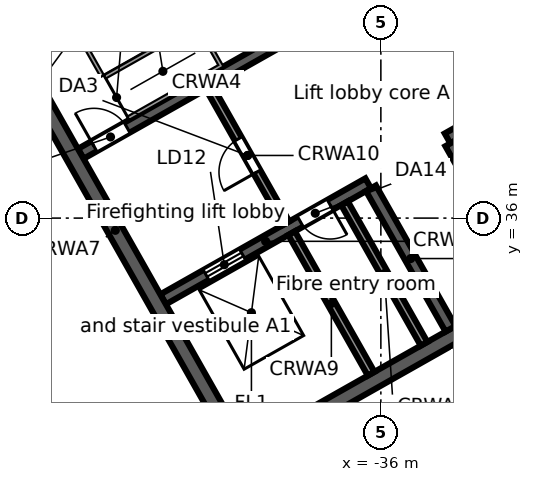
"""IFC4 building model, lengths in metres.
Left out: names, types, materials, properties, quantities, classifications, styles, units other than length and angle.
Written with IfcOpenShell. Run it as: python <this file> out.ifc"""

import sys

from ifc_helpers import new_model, si_unit, direction, frame, frame_2d, origin, place, context, subcontext, project, spatial, rectangle, extrude, element, fill, save


model = new_model("IFC4")
c1 = context("Model", 3, precision=1e-05, world=origin(), true_north=direction((0.0, 1.0)))
c2 = subcontext(c1, "Body", "Model", "MODEL_VIEW")
j1 = project(units=[si_unit("LENGTHUNIT", "METRE"), si_unit("PLANEANGLEUNIT", "RADIAN")], contexts=[c1])
p1 = place(None, origin())
s1 = spatial("IfcSite", under=j1, at=p1, CompositionType="ELEMENT")
p2 = place(p1, origin())
s2 = spatial("IfcBuilding", under=s1, at=p2, CompositionType="ELEMENT")
p3 = place(p2, frame((0.0, 0.0, 308.3)))
s3 = spatial("IfcBuildingStorey", under=s2, at=p3, CompositionType="ELEMENT", Elevation=308.3)
p4 = place(p3, frame((-58.732, 38.771, 0.0), z_axis=(0.0, 0.0, 1.0), x_axis=(0.870355615581, 0.492423702137, 0.0)))
e1 = element("IfcWall", 1, at=p4, inside=s3, PredefinedType="STANDARD", context=c2, shape_type="SweptSolid", body=[
    extrude(rectangle(XDim=64.052, YDim=0.25, at=frame_2d((32.026, 0.0))), origin(), (0.0, 0.0, 1.0), 3.45),
])
p5 = place(p4, frame((61.259, 0.0, 0.8)))
e2 = element("IfcOpeningElement", 2, at=p5, cuts=e1, PredefinedType="OPENING", context=c2, shape_type="SweptSolid", body=[
    extrude(rectangle(XDim=2.4, YDim=2.2, at=frame_2d((1.2, 1.1))), frame((0.0, 0.135, 0.0), z_axis=(0.0, -1.0, 0.0), x_axis=(1.0, 0.0, 0.0)), (0.0, 0.0, 1.0), 0.27),
])
p6 = place(p4, frame((58.216, 0.0, 0.8)))
e3 = element("IfcOpeningElement", 3, at=p6, cuts=e1, PredefinedType="OPENING", context=c2, shape_type="SweptSolid", body=[
    extrude(rectangle(XDim=2.4, YDim=2.2, at=frame_2d((1.2, 1.1))), frame((0.0, 0.135, 0.0), z_axis=(0.0, -1.0, 0.0), x_axis=(1.0, 0.0, 0.0)), (0.0, 0.0, 1.0), 0.27),
])
p7 = place(p4, frame((55.173, 0.0, 0.8)))
e4 = element("IfcOpeningElement", 4, at=p7, cuts=e1, PredefinedType="OPENING", context=c2, shape_type="SweptSolid", body=[
    extrude(rectangle(XDim=2.4, YDim=2.2, at=frame_2d((1.2, 1.1))), frame((0.0, 0.135, 0.0), z_axis=(0.0, -1.0, 0.0), x_axis=(1.0, 0.0, 0.0)), (0.0, 0.0, 1.0), 0.27),
])
p8 = place(p4, frame((52.129, 0.0, 0.8)))
e5 = element("IfcOpeningElement", 5, at=p8, cuts=e1, PredefinedType="OPENING", context=c2, shape_type="SweptSolid", body=[
    extrude(rectangle(XDim=2.4, YDim=2.2, at=frame_2d((1.2, 1.1))), frame((0.0, 0.135, 0.0), z_axis=(0.0, -1.0, 0.0), x_axis=(1.0, 0.0, 0.0)), (0.0, 0.0, 1.0), 0.27),
])
p9 = place(p4, frame((49.086, 0.0, 0.8)))
e6 = element("IfcOpeningElement", 6, at=p9, cuts=e1, PredefinedType="OPENING", context=c2, shape_type="SweptSolid", body=[
    extrude(rectangle(XDim=2.4, YDim=2.2, at=frame_2d((1.2, 1.1))), frame((0.0, 0.135, 0.0), z_axis=(0.0, -1.0, 0.0), x_axis=(1.0, 0.0, 0.0)), (0.0, 0.0, 1.0), 0.27),
])
p10 = place(p4, frame((46.043, 0.0, 0.8)))
e7 = element("IfcOpeningElement", 7, at=p10, cuts=e1, PredefinedType="OPENING", context=c2, shape_type="SweptSolid", body=[
    extrude(rectangle(XDim=2.4, YDim=2.2, at=frame_2d((1.2, 1.1))), frame((0.0, 0.135, 0.0), z_axis=(0.0, -1.0, 0.0), x_axis=(1.0, 0.0, 0.0)), (0.0, 0.0, 1.0), 0.27),
])
p11 = place(p4, frame((43.0, 0.0, 0.8)))
e8 = element("IfcOpeningElement", 8, at=p11, cuts=e1, PredefinedType="OPENING", context=c2, shape_type="SweptSolid", body=[
    extrude(rectangle(XDim=2.4, YDim=2.2, at=frame_2d((1.2, 1.1))), frame((0.0, 0.135, 0.0), z_axis=(0.0, -1.0, 0.0), x_axis=(1.0, 0.0, 0.0)), (0.0, 0.0, 1.0), 0.27),
])
p12 = place(p4, frame((39.956, 0.0, 0.8)))
e9 = element("IfcOpeningElement", 9, at=p12, cuts=e1, PredefinedType="OPENING", context=c2, shape_type="SweptSolid", body=[
    extrude(rectangle(XDim=2.4, YDim=2.2, at=frame_2d((1.2, 1.1))), frame((0.0, 0.135, 0.0), z_axis=(0.0, -1.0, 0.0), x_axis=(1.0, 0.0, 0.0)), (0.0, 0.0, 1.0), 0.27),
])
p13 = place(p4, frame((36.913, 0.0, 0.8)))
e10 = element("IfcOpeningElement", 10, at=p13, cuts=e1, PredefinedType="OPENING", context=c2, shape_type="SweptSolid", body=[
    extrude(rectangle(XDim=2.4, YDim=2.2, at=frame_2d((1.2, 1.1))), frame((0.0, 0.135, 0.0), z_axis=(0.0, -1.0, 0.0), x_axis=(1.0, 0.0, 0.0)), (0.0, 0.0, 1.0), 0.27),
])
p14 = place(p4, frame((33.87, 0.0, 0.8)))
e11 = element("IfcOpeningElement", 11, at=p14, cuts=e1, PredefinedType="OPENING", context=c2, shape_type="SweptSolid", body=[
    extrude(rectangle(XDim=2.4, YDim=2.2, at=frame_2d((1.2, 1.1))), frame((0.0, 0.135, 0.0), z_axis=(0.0, -1.0, 0.0), x_axis=(1.0, 0.0, 0.0)), (0.0, 0.0, 1.0), 0.27),
])
p15 = place(p4, frame((30.826, 0.0, 0.8)))
e12 = element("IfcOpeningElement", 12, at=p15, cuts=e1, PredefinedType="OPENING", context=c2, shape_type="SweptSolid", body=[
    extrude(rectangle(XDim=2.4, YDim=2.2, at=frame_2d((1.2, 1.1))), frame((0.0, 0.135, 0.0), z_axis=(0.0, -1.0, 0.0), x_axis=(1.0, 0.0, 0.0)), (0.0, 0.0, 1.0), 0.27),
])
p16 = place(p4, frame((27.783, 0.0, 0.8)))
e13 = element("IfcOpeningElement", 13, at=p16, cuts=e1, PredefinedType="OPENING", context=c2, shape_type="SweptSolid", body=[
    extrude(rectangle(XDim=2.4, YDim=2.2, at=frame_2d((1.2, 1.1))), frame((0.0, 0.135, 0.0), z_axis=(0.0, -1.0, 0.0), x_axis=(1.0, 0.0, 0.0)), (0.0, 0.0, 1.0), 0.27),
])
p17 = place(p4, frame((24.74, 0.0, 0.8)))
e14 = element("IfcOpeningElement", 14, at=p17, cuts=e1, PredefinedType="OPENING", context=c2, shape_type="SweptSolid", body=[
    extrude(rectangle(XDim=2.4, YDim=2.2, at=frame_2d((1.2, 1.1))), frame((0.0, 0.135, 0.0), z_axis=(0.0, -1.0, 0.0), x_axis=(1.0, 0.0, 0.0)), (0.0, 0.0, 1.0), 0.27),
])
p18 = place(p4, frame((21.696, 0.0, 0.8)))
e15 = element("IfcOpeningElement", 15, at=p18, cuts=e1, PredefinedType="OPENING", context=c2, shape_type="SweptSolid", body=[
    extrude(rectangle(XDim=2.4, YDim=2.2, at=frame_2d((1.2, 1.1))), frame((0.0, 0.135, 0.0), z_axis=(0.0, -1.0, 0.0), x_axis=(1.0, 0.0, 0.0)), (0.0, 0.0, 1.0), 0.27),
])
p19 = place(p4, frame((18.653, 0.0, 0.8)))
e16 = element("IfcOpeningElement", 16, at=p19, cuts=e1, PredefinedType="OPENING", context=c2, shape_type="SweptSolid", body=[
    extrude(rectangle(XDim=2.4, YDim=2.2, at=frame_2d((1.2, 1.1))), frame((0.0, 0.135, 0.0), z_axis=(0.0, -1.0, 0.0), x_axis=(1.0, 0.0, 0.0)), (0.0, 0.0, 1.0), 0.27),
])
p20 = place(p4, frame((15.61, 0.0, 0.8)))
e17 = element("IfcOpeningElement", 17, at=p20, cuts=e1, PredefinedType="OPENING", context=c2, shape_type="SweptSolid", body=[
    extrude(rectangle(XDim=2.4, YDim=2.2, at=frame_2d((1.2, 1.1))), frame((0.0, 0.135, 0.0), z_axis=(0.0, -1.0, 0.0), x_axis=(1.0, 0.0, 0.0)), (0.0, 0.0, 1.0), 0.27),
])
p21 = place(p4, frame((12.567, 0.0, 0.8)))
e18 = element("IfcOpeningElement", 18, at=p21, cuts=e1, PredefinedType="OPENING", context=c2, shape_type="SweptSolid", body=[
    extrude(rectangle(XDim=2.4, YDim=2.2, at=frame_2d((1.2, 1.1))), frame((0.0, 0.135, 0.0), z_axis=(0.0, -1.0, 0.0), x_axis=(1.0, 0.0, 0.0)), (0.0, 0.0, 1.0), 0.27),
])
p22 = place(p4, frame((9.523, 0.0, 0.8)))
e19 = element("IfcOpeningElement", 19, at=p22, cuts=e1, PredefinedType="OPENING", context=c2, shape_type="SweptSolid", body=[
    extrude(rectangle(XDim=2.4, YDim=2.2, at=frame_2d((1.2, 1.1))), frame((0.0, 0.135, 0.0), z_axis=(0.0, -1.0, 0.0), x_axis=(1.0, 0.0, 0.0)), (0.0, 0.0, 1.0), 0.27),
])
p23 = place(p4, frame((6.48, 0.0, 0.8)))
e20 = element("IfcOpeningElement", 20, at=p23, cuts=e1, PredefinedType="OPENING", context=c2, shape_type="SweptSolid", body=[
    extrude(rectangle(XDim=2.4, YDim=2.2, at=frame_2d((1.2, 1.1))), frame((0.0, 0.135, 0.0), z_axis=(0.0, -1.0, 0.0), x_axis=(1.0, 0.0, 0.0)), (0.0, 0.0, 1.0), 0.27),
])
p24 = place(p4, frame((3.437, 0.0, 0.8)))
e21 = element("IfcOpeningElement", 21, at=p24, cuts=e1, PredefinedType="OPENING", context=c2, shape_type="SweptSolid", body=[
    extrude(rectangle(XDim=2.4, YDim=2.2, at=frame_2d((1.2, 1.1))), frame((0.0, 0.135, 0.0), z_axis=(0.0, -1.0, 0.0), x_axis=(1.0, 0.0, 0.0)), (0.0, 0.0, 1.0), 0.27),
])
p25 = place(p4, frame((0.393, 0.0, 0.8)))
e22 = element("IfcOpeningElement", 22, at=p25, cuts=e1, PredefinedType="OPENING", context=c2, shape_type="SweptSolid", body=[
    extrude(rectangle(XDim=2.4, YDim=2.2, at=frame_2d((1.2, 1.1))), frame((0.0, 0.135, 0.0), z_axis=(0.0, -1.0, 0.0), x_axis=(1.0, 0.0, 0.0)), (0.0, 0.0, 1.0), 0.27),
])
p26 = place(p3, frame((-44.115, 26.507, 0.0), z_axis=(0.0, 0.0, 1.0), x_axis=(-0.857166583633, 0.515039268311, 0.0)))
e23 = element("IfcWall", 23, at=p26, inside=s3, PredefinedType="STANDARD", context=c2, shape_type="SweptSolid", body=[
    extrude(rectangle(XDim=17.106, YDim=0.25, at=frame_2d((8.553, 0.0))), origin(), (0.0, 0.0, 1.0), 3.45),
])
p27 = place(p26, frame((14.417, 0.0, 0.8)))
e24 = element("IfcOpeningElement", 24, at=p27, cuts=e23, PredefinedType="OPENING", context=c2, shape_type="SweptSolid", body=[
    extrude(rectangle(XDim=2.4, YDim=2.2, at=frame_2d((1.2, 1.1))), frame((0.0, 0.135, 0.0), z_axis=(0.0, -1.0, 0.0), x_axis=(1.0, 0.0, 0.0)), (0.0, 0.0, 1.0), 0.27),
])
p28 = place(p26, frame((11.584, 0.0, 0.8)))
e25 = element("IfcOpeningElement", 25, at=p28, cuts=e23, PredefinedType="OPENING", context=c2, shape_type="SweptSolid", body=[
    extrude(rectangle(XDim=2.4, YDim=2.2, at=frame_2d((1.2, 1.1))), frame((0.0, 0.135, 0.0), z_axis=(0.0, -1.0, 0.0), x_axis=(1.0, 0.0, 0.0)), (0.0, 0.0, 1.0), 0.27),
])
p29 = place(p26, frame((8.75, 0.0, 0.8)))
e26 = element("IfcOpeningElement", 26, at=p29, cuts=e23, PredefinedType="OPENING", context=c2, shape_type="SweptSolid", body=[
    extrude(rectangle(XDim=2.4, YDim=2.2, at=frame_2d((1.2, 1.1))), frame((0.0, 0.135, 0.0), z_axis=(0.0, -1.0, 0.0), x_axis=(1.0, 0.0, 0.0)), (0.0, 0.0, 1.0), 0.27),
])
p30 = place(p26, frame((5.917, 0.0, 0.8)))
e27 = element("IfcOpeningElement", 27, at=p30, cuts=e23, PredefinedType="OPENING", context=c2, shape_type="SweptSolid", body=[
    extrude(rectangle(XDim=2.4, YDim=2.2, at=frame_2d((1.2, 1.1))), frame((0.0, 0.135, 0.0), z_axis=(0.0, -1.0, 0.0), x_axis=(1.0, 0.0, 0.0)), (0.0, 0.0, 1.0), 0.27),
])
p31 = place(p26, frame((3.084, 0.0, 0.8)))
e28 = element("IfcOpeningElement", 28, at=p31, cuts=e23, PredefinedType="OPENING", context=c2, shape_type="SweptSolid", body=[
    extrude(rectangle(XDim=2.4, YDim=2.2, at=frame_2d((1.2, 1.1))), frame((0.0, 0.135, 0.0), z_axis=(0.0, -1.0, 0.0), x_axis=(1.0, 0.0, 0.0)), (0.0, 0.0, 1.0), 0.27),
])
p32 = place(p26, frame((0.25, 0.0, 0.8)))
e29 = element("IfcOpeningElement", 29, at=p32, cuts=e23, PredefinedType="OPENING", context=c2, shape_type="SweptSolid", body=[
    extrude(rectangle(XDim=2.4, YDim=2.2, at=frame_2d((1.2, 1.1))), frame((0.0, 0.135, 0.0), z_axis=(0.0, -1.0, 0.0), x_axis=(1.0, 0.0, 0.0)), (0.0, 0.0, 1.0), 0.27),
])
p33 = place(p3, frame((-3.017, 46.293, 0.0), z_axis=(0.0, 0.0, 1.0), x_axis=(-0.870355474887, -0.492423950812, 0.0)))
e30 = element("IfcWall", 30, at=p33, inside=s3, PredefinedType="STANDARD", context=c2, shape_type="SweptSolid", body=[
    extrude(rectangle(XDim=40.34, YDim=0.25, at=frame_2d((20.17, 0.0))), origin(), (0.0, 0.0, 1.0), 3.45),
])
p34 = place(p33, frame((37.428, 0.0, 0.8)))
e31 = element("IfcOpeningElement", 31, at=p34, cuts=e30, PredefinedType="OPENING", context=c2, shape_type="SweptSolid", body=[
    extrude(rectangle(XDim=2.4, YDim=2.2, at=frame_2d((1.2, 1.1))), frame((0.0, 0.135, 0.0), z_axis=(0.0, -1.0, 0.0), x_axis=(1.0, 0.0, 0.0)), (0.0, 0.0, 1.0), 0.27),
])
p35 = place(p33, frame((34.372, 0.0, 0.0)))
e32 = element("IfcOpeningElement", 32, at=p35, cuts=e30, PredefinedType="OPENING", context=c2, shape_type="SweptSolid", body=[
    extrude(rectangle(XDim=1.8, YDim=2.4, at=frame_2d((0.9, 1.2))), frame((0.0, 0.135, 0.0), z_axis=(0.0, -1.0, 0.0), x_axis=(1.0, 0.0, 0.0)), (0.0, 0.0, 1.0), 0.27),
])
p36 = place(p33, frame((30.716, 0.0, 0.8)))
e33 = element("IfcOpeningElement", 33, at=p36, cuts=e30, PredefinedType="OPENING", context=c2, shape_type="SweptSolid", body=[
    extrude(rectangle(XDim=2.4, YDim=2.2, at=frame_2d((1.2, 1.1))), frame((0.0, 0.135, 0.0), z_axis=(0.0, -1.0, 0.0), x_axis=(1.0, 0.0, 0.0)), (0.0, 0.0, 1.0), 0.27),
])
p37 = place(p33, frame((27.36, 0.0, 0.8)))
e34 = element("IfcOpeningElement", 34, at=p37, cuts=e30, PredefinedType="OPENING", context=c2, shape_type="SweptSolid", body=[
    extrude(rectangle(XDim=2.4, YDim=2.2, at=frame_2d((1.2, 1.1))), frame((0.0, 0.135, 0.0), z_axis=(0.0, -1.0, 0.0), x_axis=(1.0, 0.0, 0.0)), (0.0, 0.0, 1.0), 0.27),
])
p38 = place(p33, frame((24.304, 0.0, 0.0)))
e35 = element("IfcOpeningElement", 35, at=p38, cuts=e30, PredefinedType="OPENING", context=c2, shape_type="SweptSolid", body=[
    extrude(rectangle(XDim=1.8, YDim=2.4, at=frame_2d((0.9, 1.2))), frame((0.0, 0.135, 0.0), z_axis=(0.0, -1.0, 0.0), x_axis=(1.0, 0.0, 0.0)), (0.0, 0.0, 1.0), 0.27),
])
p39 = place(p33, frame((20.648, 0.0, 0.8)))
e36 = element("IfcOpeningElement", 36, at=p39, cuts=e30, PredefinedType="OPENING", context=c2, shape_type="SweptSolid", body=[
    extrude(rectangle(XDim=2.4, YDim=2.2, at=frame_2d((1.2, 1.1))), frame((0.0, 0.135, 0.0), z_axis=(0.0, -1.0, 0.0), x_axis=(1.0, 0.0, 0.0)), (0.0, 0.0, 1.0), 0.27),
])
p40 = place(p33, frame((17.292, 0.0, 0.8)))
e37 = element("IfcOpeningElement", 37, at=p40, cuts=e30, PredefinedType="OPENING", context=c2, shape_type="SweptSolid", body=[
    extrude(rectangle(XDim=2.4, YDim=2.2, at=frame_2d((1.2, 1.1))), frame((0.0, 0.135, 0.0), z_axis=(0.0, -1.0, 0.0), x_axis=(1.0, 0.0, 0.0)), (0.0, 0.0, 1.0), 0.27),
])
p41 = place(p33, frame((14.236, 0.0, 0.0)))
e38 = element("IfcOpeningElement", 38, at=p41, cuts=e30, PredefinedType="OPENING", context=c2, shape_type="SweptSolid", body=[
    extrude(rectangle(XDim=1.8, YDim=2.4, at=frame_2d((0.9, 1.2))), frame((0.0, 0.135, 0.0), z_axis=(0.0, -1.0, 0.0), x_axis=(1.0, 0.0, 0.0)), (0.0, 0.0, 1.0), 0.27),
])
p42 = place(p33, frame((10.58, 0.0, 0.8)))
e39 = element("IfcOpeningElement", 39, at=p42, cuts=e30, PredefinedType="OPENING", context=c2, shape_type="SweptSolid", body=[
    extrude(rectangle(XDim=2.4, YDim=2.2, at=frame_2d((1.2, 1.1))), frame((0.0, 0.135, 0.0), z_axis=(0.0, -1.0, 0.0), x_axis=(1.0, 0.0, 0.0)), (0.0, 0.0, 1.0), 0.27),
])
p43 = place(p33, frame((7.224, 0.0, 0.8)))
e40 = element("IfcOpeningElement", 40, at=p43, cuts=e30, PredefinedType="OPENING", context=c2, shape_type="SweptSolid", body=[
    extrude(rectangle(XDim=2.4, YDim=2.2, at=frame_2d((1.2, 1.1))), frame((0.0, 0.135, 0.0), z_axis=(0.0, -1.0, 0.0), x_axis=(1.0, 0.0, 0.0)), (0.0, 0.0, 1.0), 0.27),
])
p44 = place(p33, frame((4.168, 0.0, 0.0)))
e41 = element("IfcOpeningElement", 41, at=p44, cuts=e30, PredefinedType="OPENING", context=c2, shape_type="SweptSolid", body=[
    extrude(rectangle(XDim=1.8, YDim=2.4, at=frame_2d((0.9, 1.2))), frame((0.0, 0.135, 0.0), z_axis=(0.0, -1.0, 0.0), x_axis=(1.0, 0.0, 0.0)), (0.0, 0.0, 1.0), 0.27),
])
p45 = place(p33, frame((0.512, 0.0, 0.8)))
e42 = element("IfcOpeningElement", 42, at=p45, cuts=e30, PredefinedType="OPENING", context=c2, shape_type="SweptSolid", body=[
    extrude(rectangle(XDim=2.4, YDim=2.2, at=frame_2d((1.2, 1.1))), frame((0.0, 0.135, 0.0), z_axis=(0.0, -1.0, 0.0), x_axis=(1.0, 0.0, 0.0)), (0.0, 0.0, 1.0), 0.27),
])
p46 = place(p3, frame((-39.813, 29.662, 0.0), z_axis=(0.0, 0.0, 1.0), x_axis=(0.870350116061, 0.492433422375, 0.0)))
e43 = element("IfcWall", 43, at=p46, inside=s3, PredefinedType="SOLIDWALL", context=c2, shape_type="SweptSolid", body=[
    extrude(rectangle(XDim=17.0, YDim=0.4, at=frame_2d((8.5, 0.0))), origin(), (0.0, 0.0, 1.0), 3.45),
])
p47 = place(p46, frame((7.2, 0.0, 0.0)))
e44 = element("IfcOpeningElement", 44, at=p47, cuts=e43, PredefinedType="OPENING", context=c2, shape_type="SweptSolid", body=[
    extrude(rectangle(XDim=1.2, YDim=2.1, at=frame_2d((0.6, 1.05))), frame((0.0, 0.21, 0.0), z_axis=(0.0, -1.0, 0.0), x_axis=(1.0, 0.0, 0.0)), (0.0, 0.0, 1.0), 0.42),
])
p48 = place(p3, frame((-41.73, 33.863, 0.0), z_axis=(0.0, 0.0, 1.0), x_axis=(0.870350800578, 0.492432212525, 0.0)))
e45 = element("IfcWall", 45, at=p48, inside=s3, PredefinedType="SOLIDWALL", context=c2, shape_type="SweptSolid", body=[
    extrude(rectangle(XDim=6.2, YDim=0.3, at=frame_2d((3.1, 0.0))), origin(), (0.0, 0.0, 1.0), 3.45),
])
p49 = place(p48, frame((1.3, 0.0, 0.0)))
e46 = element("IfcOpeningElement", 46, at=p49, cuts=e45, PredefinedType="OPENING", context=c2, shape_type="SweptSolid", body=[
    extrude(rectangle(XDim=1.1, YDim=2.1, at=frame_2d((0.55, 1.05))), frame((0.0, 0.16, 0.0), z_axis=(0.0, -1.0, 0.0), x_axis=(1.0, 0.0, 0.0)), (0.0, 0.0, 1.0), 0.32),
])
p50 = place(p48, frame((4.15, 0.0, 0.0)))
e47 = element("IfcOpeningElement", 47, at=p50, cuts=e45, PredefinedType="OPENING", context=c2, shape_type="SweptSolid", body=[
    extrude(rectangle(XDim=0.9, YDim=2.1, at=frame_2d((0.45, 1.05))), frame((0.0, 0.16, 0.0), z_axis=(0.0, -1.0, 0.0), x_axis=(1.0, 0.0, 0.0)), (0.0, 0.0, 1.0), 0.32),
])
p51 = place(p3, frame((-34.245, 38.097, 0.0), z_axis=(0.0, 0.0, 1.0), x_axis=(0.870356351998, 0.492422400523, 0.0)))
e48 = element("IfcWall", 48, at=p51, inside=s3, PredefinedType="SOLIDWALL", context=c2, shape_type="SweptSolid", body=[
    extrude(rectangle(XDim=7.6, YDim=0.3, at=frame_2d((3.8, 0.0))), origin(), (0.0, 0.0, 1.0), 3.45),
])
p52 = place(p51, frame((6.2, 0.0, 0.0)))
e49 = element("IfcOpeningElement", 49, at=p52, cuts=e48, PredefinedType="OPENING", context=c2, shape_type="SweptSolid", body=[
    extrude(rectangle(XDim=1.0, YDim=2.1, at=frame_2d((0.5, 1.05))), frame((0.0, 0.16, 0.0), z_axis=(0.0, -1.0, 0.0), x_axis=(1.0, 0.0, 0.0)), (0.0, 0.0, 1.0), 0.32),
])
p53 = place(p3, frame((-43.897, 37.692, 0.0), z_axis=(0.0, 0.0, 1.0), x_axis=(0.870356351998, 0.492422400523, 0.0)))
e50 = element("IfcWall", 50, at=p53, inside=s3, PredefinedType="SOLIDWALL", context=c2, shape_type="SweptSolid", body=[
    extrude(rectangle(XDim=7.6, YDim=0.3, at=frame_2d((3.8, 0.0))), origin(), (0.0, 0.0, 1.0), 3.45),
])
p54 = place(p53, frame((0.4, 0.0, 0.0)))
e51 = element("IfcOpeningElement", 51, at=p54, cuts=e50, PredefinedType="OPENING", context=c2, shape_type="SweptSolid", body=[
    extrude(rectangle(XDim=1.0, YDim=2.1, at=frame_2d((0.5, 1.05))), frame((0.0, 0.16, 0.0), z_axis=(0.0, -1.0, 0.0), x_axis=(1.0, 0.0, 0.0)), (0.0, 0.0, 1.0), 0.32),
])
p55 = place(p3, frame((-46.238, 41.423, 0.0), z_axis=(0.0, 0.0, 1.0), x_axis=(0.492421663121, -0.870356769198, 0.0)))
e52 = element("IfcWall", 52, at=p55, inside=s3, PredefinedType="SOLIDWALL", context=c2, shape_type="SweptSolid", body=[
    extrude(rectangle(XDim=13.2, YDim=0.4, at=frame_2d((6.6, 0.0))), origin(), (0.0, 0.0, 1.0), 3.45),
])
p56 = place(p3, frame((-38.349, 35.603, 0.0), z_axis=(0.0, 0.0, 1.0), x_axis=(0.492397924348, -0.870370199454, 0.0)))
e53 = element("IfcWall", 53, at=p56, inside=s3, PredefinedType="SOLIDWALL", context=c2, shape_type="SweptSolid", body=[
    extrude(rectangle(XDim=4.25, YDim=0.2, at=frame_2d((2.125, 0.0))), origin(), (0.0, 0.0, 1.0), 3.45),
])
p57 = place(p3, frame((-40.516, 39.433, 0.0), z_axis=(0.0, 0.0, 1.0), x_axis=(0.492453559952, -0.87033872216, 0.0)))
e54 = element("IfcWall", 54, at=p57, inside=s3, PredefinedType="PARTITIONING", context=c2, shape_type="SweptSolid", body=[
    extrude(rectangle(XDim=4.1, YDim=0.2, at=frame_2d((2.05, 0.0))), origin(), (0.0, 0.0, 1.0), 3.45),
])
p58 = place(p57, frame((1.55, 0.0, 0.0)))
e55 = element("IfcOpeningElement", 55, at=p58, cuts=e54, PredefinedType="OPENING", context=c2, shape_type="SweptSolid", body=[
    extrude(rectangle(XDim=1.0, YDim=2.1, at=frame_2d((0.5, 1.05))), frame((0.0, 0.11, 0.0), z_axis=(0.0, -1.0, 0.0), x_axis=(1.0, 0.0, 0.0)), (0.0, 0.0, 1.0), 0.22),
])
p59 = place(p3, frame((-36.956, 36.391, 0.0), z_axis=(0.0, 0.0, 1.0), x_axis=(0.492397924348, -0.870370199454, 0.0)))
e56 = element("IfcWall", 56, at=p59, inside=s3, PredefinedType="SOLIDWALL", context=c2, shape_type="SweptSolid", body=[
    extrude(rectangle(XDim=4.25, YDim=0.2, at=frame_2d((2.125, 0.0))), origin(), (0.0, 0.0, 1.0), 3.45),
])
for number, where, z_axis, x_axis in (
    (57, (-36.26, 36.785, 0.0), (0.0, 0.0, 1.0), (0.492, -0.87, 0.0)),
    (58, (-34.171, 37.967, 0.0), (0.0, 0.0, 1.0), (0.492, -0.87, 0.0)),
):
    element("IfcWall", number, at=place(p3, frame(where, z_axis=z_axis, x_axis=x_axis)), inside=s3, PredefinedType="SOLIDWALL", context=c2, shape_type="SweptSolid", body=[
        extrude(rectangle(XDim=4.25, YDim=0.3, at=frame_2d((2.125, 0.0))), origin(), (0.0, 0.0, 1.0), 3.45),
    ])
p60 = place(p49, origin())
e59 = element("IfcDoor", 59, at=p60, inside=s3, OperationType="DOUBLE_DOOR_SLIDING", PredefinedType="DOOR", context=c2, shape_type="SweptSolid", body=[
    extrude(rectangle(XDim=1.1, YDim=2.1, at=frame_2d((0.55, 1.05))), frame((0.0, 0.025, 0.0), z_axis=(0.0, -1.0, 0.0), x_axis=(1.0, 0.0, 0.0)), (0.0, 0.0, 1.0), 0.05),
])
fill(e46, e59)
p61 = place(p54, origin())
e60 = element("IfcDoor", 60, at=p61, inside=s3, OperationType="SINGLE_SWING_LEFT", PredefinedType="DOOR", context=c2, shape_type="SweptSolid", body=[
    extrude(rectangle(XDim=1.0, YDim=2.1, at=frame_2d((0.5, 1.05))), frame((0.0, 0.025, 0.0), z_axis=(0.0, -1.0, 0.0), x_axis=(1.0, 0.0, 0.0)), (0.0, 0.0, 1.0), 0.05),
])
fill(e51, e60)
p62 = place(p58, frame((1.0, 0.0, 0.0), z_axis=(0.0, 0.0, 1.0), x_axis=(-1.0, 0.0, 0.0)))
e61 = element("IfcDoor", 61, at=p62, inside=s3, OperationType="SINGLE_SWING_LEFT", PredefinedType="DOOR", context=c2, shape_type="SweptSolid", body=[
    extrude(rectangle(XDim=1.0, YDim=2.1, at=frame_2d((0.5, 1.05))), frame((0.0, 0.025, 0.0), z_axis=(0.0, -1.0, 0.0), x_axis=(1.0, 0.0, 0.0)), (0.0, 0.0, 1.0), 0.05),
])
fill(e55, e61)
p63 = place(p50, frame((0.9, 0.0, 0.0), z_axis=(0.0, 0.0, 1.0), x_axis=(-1.0, 0.0, 0.0)))
e62 = element("IfcDoor", 62, at=p63, inside=s3, OperationType="SINGLE_SWING_LEFT", PredefinedType="DOOR", context=c2, shape_type="SweptSolid", body=[
    extrude(rectangle(XDim=0.9, YDim=2.1, at=frame_2d((0.45, 1.05))), frame((0.0, 0.025, 0.0), z_axis=(0.0, -1.0, 0.0), x_axis=(1.0, 0.0, 0.0)), (0.0, 0.0, 1.0), 0.05),
])
fill(e47, e62)
save(model, sys.argv[1])
